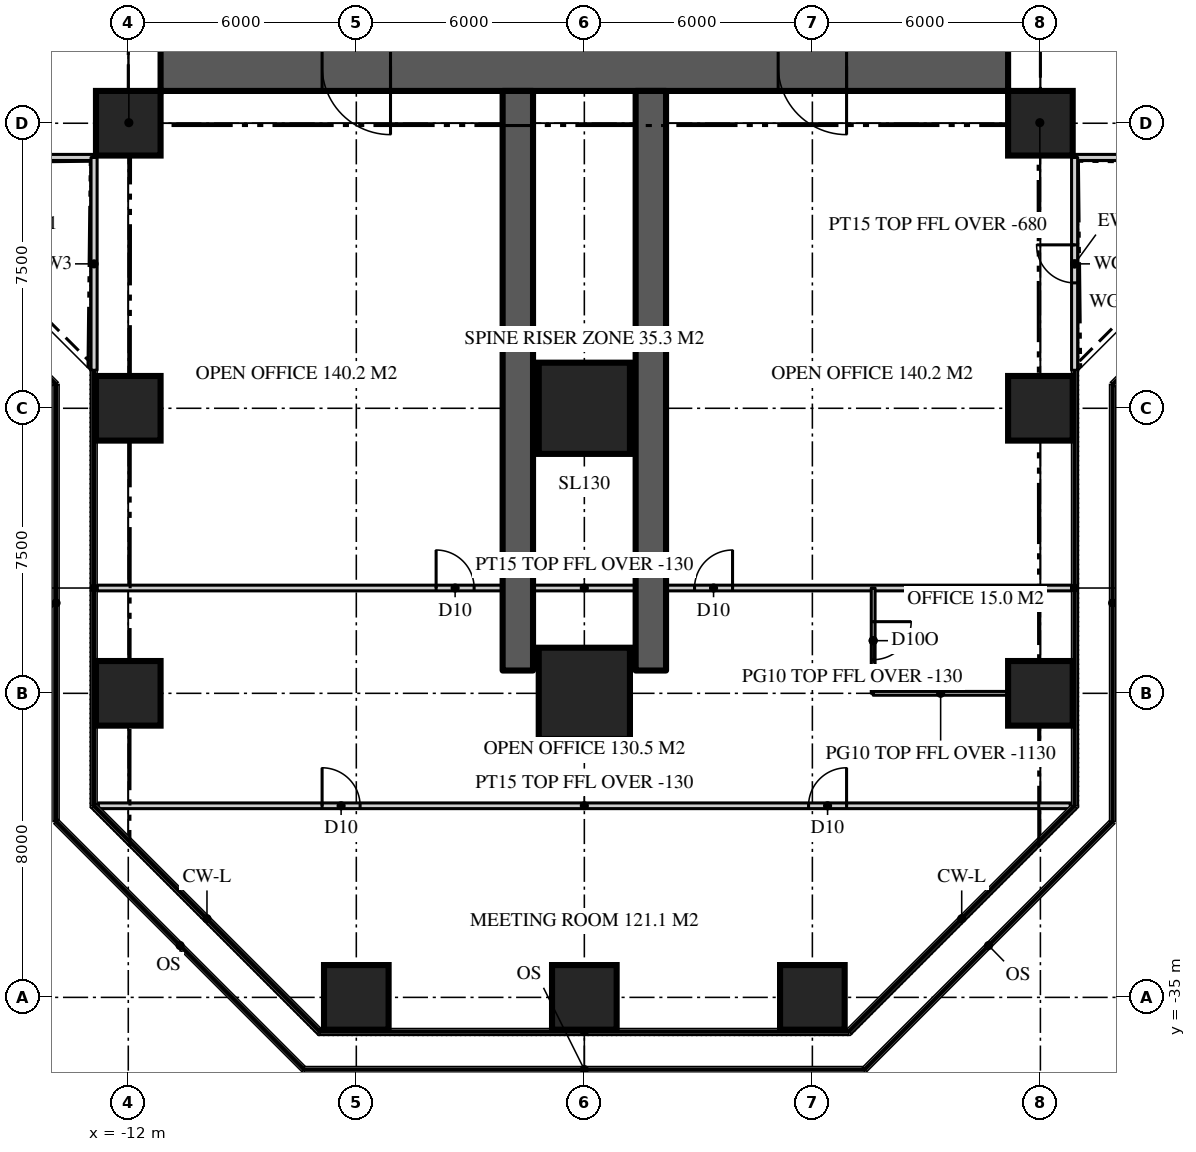
"""IFC4 building model, lengths in metres.
Left out: names, types, materials, properties, quantities, classifications, styles, units other than length and angle.
Written with IfcOpenShell. Run it as: python <this file> out.ifc"""

import sys

from ifc_helpers import new_model, si_unit, direction, frame, frame_2d, origin, origin_2d, place, context, subcontext, project, spatial, rectangle, extrude, element, fill, save


model = new_model("IFC4")
c1 = context("Model", 3, precision=1e-05, world=origin(), true_north=direction((0.0, 1.0)))
c2 = subcontext(c1, "Body", "Model", "MODEL_VIEW")
j1 = project(units=[si_unit("LENGTHUNIT", "METRE"), si_unit("PLANEANGLEUNIT", "RADIAN")], contexts=[c1])
p1 = place(None, origin())
s1 = spatial("IfcSite", under=j1, at=p1, CompositionType="ELEMENT")
p2 = place(p1, origin())
s2 = spatial("IfcBuilding", under=s1, at=p2, CompositionType="ELEMENT")
p3 = place(p2, frame((0.0, 0.0, 55.2)))
s3 = spatial("IfcBuildingStorey", under=s2, at=p3, CompositionType="ELEMENT", Elevation=55.2)
p4 = place(p3, frame((11.15, -10.5, 0.0), z_axis=(0.0, 0.0, 1.0), x_axis=(-1.0, 0.0, 0.0)))
e1 = element("IfcWall", 1, at=p4, inside=s3, PredefinedType="SHEAR", context=c2, shape_type="SweptSolid", body=[
    extrude(rectangle(XDim=22.3, YDim=1.3, at=frame_2d((11.15, 0.0))), origin(), (0.0, 0.0, 1.0), 3.9),
])
p5 = place(p4, frame((16.25, 0.0, 0.0)))
e2 = element("IfcOpeningElement", 2, at=p5, cuts=e1, PredefinedType="OPENING", context=c2, shape_type="SweptSolid", body=[
    extrude(rectangle(XDim=1.8, YDim=2.2, at=frame_2d((0.9, 1.1))), frame((0.0, 0.66, 0.0), z_axis=(0.0, -1.0, 0.0), x_axis=(1.0, 0.0, 0.0)), (0.0, 0.0, 1.0), 1.32),
])
p6 = place(p4, frame((4.25, 0.0, 0.0)))
e3 = element("IfcOpeningElement", 3, at=p6, cuts=e1, PredefinedType="OPENING", context=c2, shape_type="SweptSolid", body=[
    extrude(rectangle(XDim=1.8, YDim=2.2, at=frame_2d((0.9, 1.1))), frame((0.0, 0.66, 0.0), z_axis=(0.0, -1.0, 0.0), x_axis=(1.0, 0.0, 0.0)), (0.0, 0.0, 1.0), 1.32),
])
for number, where, z_axis, x_axis in (
    (4, (-1.75, -11.15, 0.0), (0.0, 0.0, 1.0), (0.0, -1.0, 0.0)),
    (5, (1.75, -11.15, 0.0), (0.0, 0.0, 1.0), (0.0, -1.0, 0.0)),
):
    element("IfcWall", number, at=place(p3, frame(where, z_axis=z_axis, x_axis=x_axis)), inside=s3, PredefinedType="SHEAR", context=c2, shape_type="SweptSolid", body=[
        extrude(rectangle(XDim=15.25, YDim=0.8, at=frame_2d((7.625, 0.0))), origin(), (0.0, 0.0, 1.0), 3.9),
    ])
for number, where, z_axis, x_axis in (
    (6, (-6.0, -35.0, 0.0), (0.0, 0.0, 1.0), (1.0, 0.0, 0.0)),
    (7, (0.0, -35.0, 0.0), (0.0, 0.0, 1.0), (1.0, 0.0, 0.0)),
    (8, (6.0, -35.0, 0.0), (0.0, 0.0, 1.0), (1.0, 0.0, 0.0)),
    (9, (-12.0, -27.0, 0.0), (0.0, 0.0, 1.0), (1.0, 0.0, 0.0)),
):
    element("IfcColumn", number, at=place(p3, frame(where, z_axis=z_axis, x_axis=x_axis)), inside=s3, PredefinedType="COLUMN", context=c2, shape_type="SweptSolid", body=[
        extrude(rectangle(XDim=1.7, YDim=1.7, at=origin_2d()), origin(), (0.0, 0.0, 1.0), 3.9),
    ])
p7 = place(p3, frame((0.0, -27.0, 0.0), z_axis=(0.0, 0.0, 1.0), x_axis=(1.0, 0.0, 0.0)))
e10 = element("IfcColumn", 10, at=p7, inside=s3, PredefinedType="COLUMN", context=c2, shape_type="SweptSolid", body=[
    extrude(rectangle(XDim=2.4, YDim=2.4, at=origin_2d()), origin(), (0.0, 0.0, 1.0), 3.9),
])
for number, where, z_axis, x_axis in (
    (11, (12.0, -27.0, 0.0), (0.0, 0.0, 1.0), (1.0, 0.0, 0.0)),
    (12, (-12.0, -19.5, 0.0), (0.0, 0.0, 1.0), (1.0, 0.0, 0.0)),
):
    element("IfcColumn", number, at=place(p3, frame(where, z_axis=z_axis, x_axis=x_axis)), inside=s3, PredefinedType="COLUMN", context=c2, shape_type="SweptSolid", body=[
        extrude(rectangle(XDim=1.7, YDim=1.7, at=origin_2d()), origin(), (0.0, 0.0, 1.0), 3.9),
    ])
p8 = place(p3, frame((0.0, -19.5, 0.0), z_axis=(0.0, 0.0, 1.0), x_axis=(1.0, 0.0, 0.0)))
e13 = element("IfcColumn", 13, at=p8, inside=s3, PredefinedType="COLUMN", context=c2, shape_type="SweptSolid", body=[
    extrude(rectangle(XDim=2.4, YDim=2.4, at=origin_2d()), origin(), (0.0, 0.0, 1.0), 3.9),
])
for number, where, z_axis, x_axis in (
    (14, (12.0, -19.5, 0.0), (0.0, 0.0, 1.0), (1.0, 0.0, 0.0)),
    (15, (-12.0, -12.0, 0.0), (0.0, 0.0, 1.0), (1.0, 0.0, 0.0)),
    (16, (12.0, -12.0, 0.0), (0.0, 0.0, 1.0), (1.0, 0.0, 0.0)),
):
    element("IfcColumn", number, at=place(p3, frame(where, z_axis=z_axis, x_axis=x_axis)), inside=s3, PredefinedType="COLUMN", context=c2, shape_type="SweptSolid", body=[
        extrude(rectangle(XDim=1.7, YDim=1.7, at=origin_2d()), origin(), (0.0, 0.0, 1.0), 3.9),
    ])
p9 = place(p3, frame((12.9, -12.9, 0.0), z_axis=(0.0, 0.0, 1.0), x_axis=(1.0, 0.0, 0.0)))
e17 = element("IfcWall", 17, at=p9, inside=s3, PredefinedType="SOLIDWALL", context=c2, shape_type="SweptSolid", body=[
    extrude(rectangle(XDim=5.6, YDim=0.16, at=frame_2d((2.8, 0.0))), origin(), (0.0, 0.0, 1.0), 3.77),
])
p10 = place(p3, frame((-18.5, -12.9, 0.0), z_axis=(0.0, 0.0, 1.0), x_axis=(1.0, 0.0, 0.0)))
e18 = element("IfcWall", 18, at=p10, inside=s3, PredefinedType="SOLIDWALL", context=c2, shape_type="SweptSolid", body=[
    extrude(rectangle(XDim=5.6, YDim=0.16, at=frame_2d((2.8, 0.0))), origin(), (0.0, 0.0, 1.0), 3.77),
])
p11 = place(p10, frame((2.3, 0.0, 0.0)))
e19 = element("IfcOpeningElement", 19, at=p11, cuts=e18, PredefinedType="OPENING", context=c2, shape_type="SweptSolid", body=[
    extrude(rectangle(XDim=1.0, YDim=2.2, at=frame_2d((0.5, 1.1))), frame((0.0, 0.09, 0.0), z_axis=(0.0, -1.0, 0.0), x_axis=(1.0, 0.0, 0.0)), (0.0, 0.0, 1.0), 0.18),
])
p12 = place(p3, frame((-12.9, -12.9, 0.0), z_axis=(0.0, 0.0, 1.0), x_axis=(0.0, -1.0, 0.0)))
e20 = element("IfcWall", 20, at=p12, inside=s3, PredefinedType="SOLIDWALL", context=c2, shape_type="SweptSolid", body=[
    extrude(rectangle(XDim=5.6, YDim=0.16, at=frame_2d((2.8, 0.0))), origin(), (0.0, 0.0, 1.0), 3.77),
])
p13 = place(p3, frame((12.9, -18.5, 0.0), z_axis=(0.0, 0.0, 1.0), x_axis=(0.0, 1.0, 0.0)))
e21 = element("IfcWall", 21, at=p13, inside=s3, PredefinedType="SOLIDWALL", context=c2, shape_type="SweptSolid", body=[
    extrude(rectangle(XDim=5.6, YDim=0.16, at=frame_2d((2.8, 0.0))), origin(), (0.0, 0.0, 1.0), 3.77),
])
p14 = place(p13, frame((2.3, 0.0, 0.0)))
e22 = element("IfcOpeningElement", 22, at=p14, cuts=e21, PredefinedType="OPENING", context=c2, shape_type="SweptSolid", body=[
    extrude(rectangle(XDim=1.0, YDim=2.2, at=frame_2d((0.5, 1.1))), frame((0.0, 0.09, 0.0), z_axis=(0.0, -1.0, 0.0), x_axis=(1.0, 0.0, 0.0)), (0.0, 0.0, 1.0), 0.18),
])
p15 = place(p3, frame((-12.82, -24.229, 0.0), z_axis=(0.0, 0.0, 1.0), x_axis=(1.0, 0.0, 0.0)))
e23 = element("IfcWall", 23, at=p15, inside=s3, PredefinedType="PARTITIONING", context=c2, shape_type="SweptSolid", body=[
    extrude(rectangle(XDim=25.64, YDim=0.15, at=frame_2d((12.82, 0.0))), origin(), (0.0, 0.0, 1.0), 3.77),
])
p16 = place(p15, frame((15.72, 0.0, 0.0)))
e24 = element("IfcOpeningElement", 24, at=p16, cuts=e23, PredefinedType="OPENING", context=c2, shape_type="SweptSolid", body=[
    extrude(rectangle(XDim=1.0, YDim=2.2, at=frame_2d((0.5, 1.1))), frame((0.0, 0.085, 0.0), z_axis=(0.0, -1.0, 0.0), x_axis=(1.0, 0.0, 0.0)), (0.0, 0.0, 1.0), 0.17),
])
p17 = place(p15, frame((8.92, 0.0, 0.0)))
e25 = element("IfcOpeningElement", 25, at=p17, cuts=e23, PredefinedType="OPENING", context=c2, shape_type="SweptSolid", body=[
    extrude(rectangle(XDim=1.0, YDim=2.2, at=frame_2d((0.5, 1.1))), frame((0.0, 0.085, 0.0), z_axis=(0.0, -1.0, 0.0), x_axis=(1.0, 0.0, 0.0)), (0.0, 0.0, 1.0), 0.17),
])
p18 = place(p3, frame((-12.786, -29.959, 0.0), z_axis=(0.0, 0.0, 1.0), x_axis=(1.0, 0.0, 0.0)))
e26 = element("IfcWall", 26, at=p18, inside=s3, PredefinedType="PARTITIONING", context=c2, shape_type="SweptSolid", body=[
    extrude(rectangle(XDim=25.573, YDim=0.15, at=frame_2d((12.786, 0.0))), origin(), (0.0, 0.0, 1.0), 3.77),
])
p19 = place(p18, frame((18.687, 0.0, 0.0)))
e27 = element("IfcOpeningElement", 27, at=p19, cuts=e26, PredefinedType="OPENING", context=c2, shape_type="SweptSolid", body=[
    extrude(rectangle(XDim=1.0, YDim=2.2, at=frame_2d((0.5, 1.1))), frame((0.0, 0.085, 0.0), z_axis=(0.0, -1.0, 0.0), x_axis=(1.0, 0.0, 0.0)), (0.0, 0.0, 1.0), 0.17),
])
p20 = place(p18, frame((5.886, 0.0, 0.0)))
e28 = element("IfcOpeningElement", 28, at=p20, cuts=e26, PredefinedType="OPENING", context=c2, shape_type="SweptSolid", body=[
    extrude(rectangle(XDim=1.0, YDim=2.2, at=frame_2d((0.5, 1.1))), frame((0.0, 0.085, 0.0), z_axis=(0.0, -1.0, 0.0), x_axis=(1.0, 0.0, 0.0)), (0.0, 0.0, 1.0), 0.17),
])
p21 = place(p3, frame((7.6, -24.229, 0.0), z_axis=(0.0, 0.0, 1.0), x_axis=(0.0, -1.0, 0.0)))
e29 = element("IfcWall", 29, at=p21, inside=s3, PredefinedType="PARTITIONING", context=c2, shape_type="SweptSolid", body=[
    extrude(rectangle(XDim=2.771, YDim=0.1, at=frame_2d((1.385, 0.0))), origin(), (0.0, 0.0, 1.0), 3.77),
])
p22 = place(p21, frame((0.885, 0.0, 0.0)))
e30 = element("IfcOpeningElement", 30, at=p22, cuts=e29, PredefinedType="OPENING", context=c2, shape_type="SweptSolid", body=[
    extrude(rectangle(XDim=1.0, YDim=2.2, at=frame_2d((0.5, 1.1))), frame((0.0, 0.06, 0.0), z_axis=(0.0, -1.0, 0.0), x_axis=(1.0, 0.0, 0.0)), (0.0, 0.0, 1.0), 0.12),
])
p23 = place(p3, frame((7.6, -27.0, 0.0), z_axis=(0.0, 0.0, 1.0), x_axis=(1.0, 0.0, 0.0)))
e31 = element("IfcWall", 31, at=p23, inside=s3, PredefinedType="PARTITIONING", context=c2, shape_type="SweptSolid", body=[
    extrude(rectangle(XDim=3.55, YDim=0.1, at=frame_2d((1.775, 0.0))), origin(), (0.0, 0.0, 1.0), 2.77),
])
for number, where, z_axis, x_axis in (
    (32, (-11.15, -11.15, 0.0), (0.0, 0.0, 1.0), (-0.707, -0.707, 0.0)),
    (33, (11.15, -11.15, 0.0), (0.0, 0.0, 1.0), (0.707, -0.707, 0.0)),
):
    element("IfcWall", number, at=place(p3, frame(where, z_axis=z_axis, x_axis=x_axis)), inside=s3, PredefinedType="PARTITIONING", context=c2, shape_type="SweptSolid", body=[
        extrude(rectangle(XDim=2.362, YDim=0.15, at=frame_2d((1.181, 0.0))), origin(), (0.0, 0.0, 1.0), 3.22),
    ])
p24 = place(p14, origin())
e34 = element("IfcDoor", 34, at=p24, inside=s3, OperationType="SINGLE_SWING_RIGHT", PredefinedType="DOOR", context=c2, shape_type="SweptSolid", body=[
    extrude(rectangle(XDim=1.0, YDim=2.2, at=frame_2d((0.5, 1.1))), frame((0.0, 0.025, 0.0), z_axis=(0.0, -1.0, 0.0), x_axis=(1.0, 0.0, 0.0)), (0.0, 0.0, 1.0), 0.05),
])
fill(e22, e34)
p25 = place(p5, origin())
e35 = element("IfcDoor", 35, at=p25, inside=s3, OperationType="DOUBLE_DOOR_DOUBLE_SWING", PredefinedType="DOOR", context=c2, shape_type="SweptSolid", body=[
    extrude(rectangle(XDim=1.8, YDim=2.2, at=frame_2d((0.9, 1.1))), frame((0.0, 0.025, 0.0), z_axis=(0.0, -1.0, 0.0), x_axis=(1.0, 0.0, 0.0)), (0.0, 0.0, 1.0), 0.05),
])
fill(e2, e35)
p26 = place(p6, origin())
e36 = element("IfcDoor", 36, at=p26, inside=s3, OperationType="DOUBLE_DOOR_DOUBLE_SWING", PredefinedType="DOOR", context=c2, shape_type="SweptSolid", body=[
    extrude(rectangle(XDim=1.8, YDim=2.2, at=frame_2d((0.9, 1.1))), frame((0.0, 0.025, 0.0), z_axis=(0.0, -1.0, 0.0), x_axis=(1.0, 0.0, 0.0)), (0.0, 0.0, 1.0), 0.05),
])
fill(e3, e36)
p27 = place(p16, origin())
e37 = element("IfcDoor", 37, at=p27, inside=s3, OperationType="SINGLE_SWING_RIGHT", PredefinedType="DOOR", context=c2, shape_type="SweptSolid", body=[
    extrude(rectangle(XDim=1.0, YDim=2.2, at=frame_2d((0.5, 1.1))), frame((0.0, 0.025, 0.0), z_axis=(0.0, -1.0, 0.0), x_axis=(1.0, 0.0, 0.0)), (0.0, 0.0, 1.0), 0.05),
])
fill(e24, e37)
p28 = place(p17, origin())
e38 = element("IfcDoor", 38, at=p28, inside=s3, OperationType="SINGLE_SWING_LEFT", PredefinedType="DOOR", context=c2, shape_type="SweptSolid", body=[
    extrude(rectangle(XDim=1.0, YDim=2.2, at=frame_2d((0.5, 1.1))), frame((0.0, 0.025, 0.0), z_axis=(0.0, -1.0, 0.0), x_axis=(1.0, 0.0, 0.0)), (0.0, 0.0, 1.0), 0.05),
])
fill(e25, e38)
p29 = place(p19, origin())
e39 = element("IfcDoor", 39, at=p29, inside=s3, OperationType="SINGLE_SWING_RIGHT", PredefinedType="DOOR", context=c2, shape_type="SweptSolid", body=[
    extrude(rectangle(XDim=1.0, YDim=2.2, at=frame_2d((0.5, 1.1))), frame((0.0, 0.025, 0.0), z_axis=(0.0, -1.0, 0.0), x_axis=(1.0, 0.0, 0.0)), (0.0, 0.0, 1.0), 0.05),
])
fill(e27, e39)
p30 = place(p20, origin())
e40 = element("IfcDoor", 40, at=p30, inside=s3, OperationType="SINGLE_SWING_LEFT", PredefinedType="DOOR", context=c2, shape_type="SweptSolid", body=[
    extrude(rectangle(XDim=1.0, YDim=2.2, at=frame_2d((0.5, 1.1))), frame((0.0, 0.025, 0.0), z_axis=(0.0, -1.0, 0.0), x_axis=(1.0, 0.0, 0.0)), (0.0, 0.0, 1.0), 0.05),
])
fill(e28, e40)
p31 = place(p22, origin())
e41 = element("IfcDoor", 41, at=p31, inside=s3, OperationType="SINGLE_SWING_LEFT", PredefinedType="DOOR", context=c2, shape_type="SweptSolid", body=[
    extrude(rectangle(XDim=1.0, YDim=2.2, at=frame_2d((0.5, 1.1))), frame((0.0, 0.025, 0.0), z_axis=(0.0, -1.0, 0.0), x_axis=(1.0, 0.0, 0.0)), (0.0, 0.0, 1.0), 0.05),
])
fill(e30, e41)
save(model, sys.argv[1])
